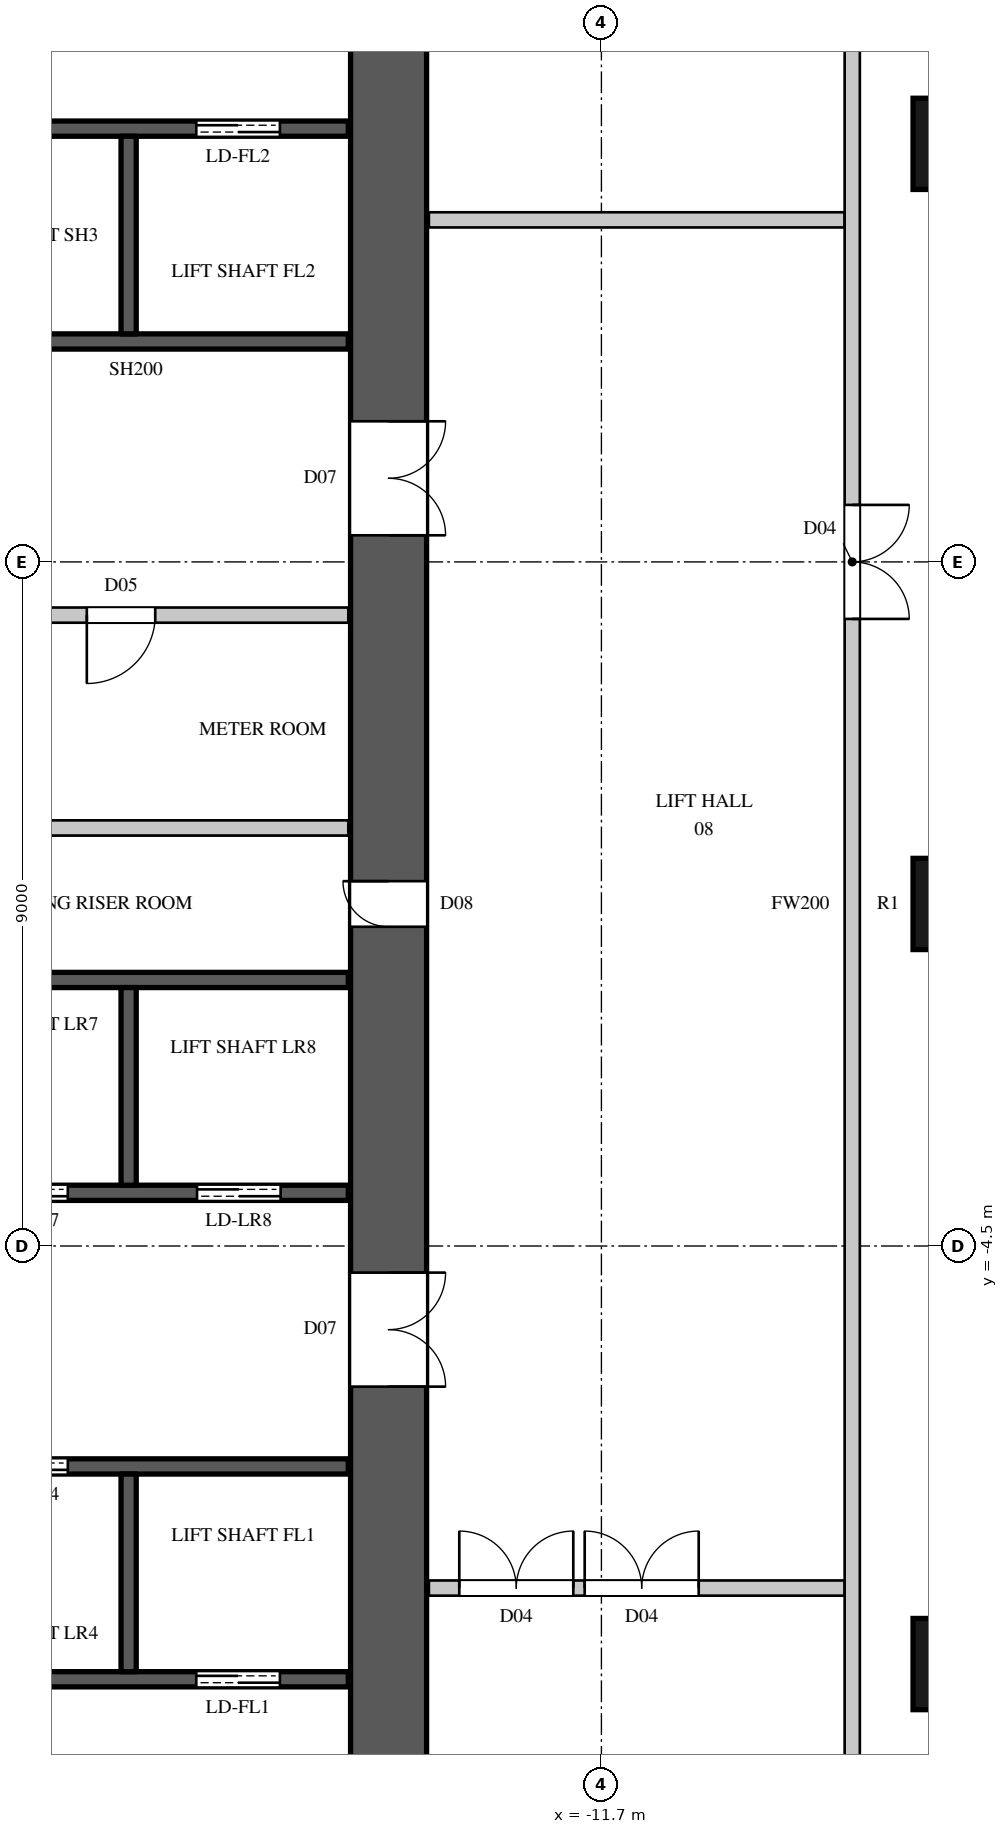
"""IFC4 building model, lengths in metres.
Left out: names, types, materials, properties, quantities, classifications, styles, units other than length and angle.
Written with IfcOpenShell. Run it as: python <this file> out.ifc"""

import sys

from ifc_helpers import new_model, si_unit, direction, frame, frame_2d, origin, origin_2d, place, context, subcontext, project, spatial, rectangle, circle, extrude, element, fill, save


model = new_model("IFC4")
c1 = context("Model", 3, precision=1e-05, world=origin(), true_north=direction((0.0, 1.0)))
c2 = subcontext(c1, "Body", "Model", "MODEL_VIEW")
j1 = project(units=[si_unit("LENGTHUNIT", "METRE"), si_unit("PLANEANGLEUNIT", "RADIAN")], contexts=[c1])
p1 = place(None, origin())
s1 = spatial("IfcSite", under=j1, at=p1, CompositionType="ELEMENT")
p2 = place(p1, origin())
s2 = spatial("IfcBuilding", under=s1, at=p2, CompositionType="ELEMENT")
p3 = place(p2, frame((0.0, 0.0, 59.1)))
s3 = spatial("IfcBuildingStorey", under=s2, at=p3, CompositionType="ELEMENT", Elevation=59.1)
for number, where, z_axis, x_axis in (
    (1, (-7.0, -10.0, 0.0), (0.0, 0.0, 1.0), (1.0, 0.0, 0.0)),
    (2, (-7.0, 0.0, 0.0), (0.0, 0.0, 1.0), (1.0, 0.0, 0.0)),
    (3, (-7.0, 10.0, 0.0), (0.0, 0.0, 1.0), (1.0, 0.0, 0.0)),
):
    element("IfcColumn", number, at=place(p3, frame(where, z_axis=z_axis, x_axis=x_axis)), inside=s3, PredefinedType="COLUMN", context=c2, shape_type="SweptSolid", body=[
        extrude(circle(Radius=0.6, at=origin_2d()), origin(), (0.0, 0.0, 1.0), 3.6),
    ])
p4 = place(p3, frame((-14.5, -14.8, 0.0), z_axis=(0.0, 0.0, 1.0), x_axis=(0.0, 1.0, 0.0)))
e4 = element("IfcWall", 4, at=p4, inside=s3, PredefinedType="SHEAR", context=c2, shape_type="SweptSolid", body=[
    extrude(rectangle(XDim=29.6, YDim=1.0, at=frame_2d((14.8, 0.0))), origin(), (0.0, 0.0, 1.0), 3.6),
])
p5 = place(p4, frame((8.45, 0.0, 0.0)))
e5 = element("IfcOpeningElement", 5, at=p5, cuts=e4, PredefinedType="OPENING", context=c2, shape_type="SweptSolid", body=[
    extrude(rectangle(XDim=1.5, YDim=2.4, at=frame_2d((0.75, 1.2))), frame((0.0, 0.51, 0.0), z_axis=(0.0, -1.0, 0.0), x_axis=(1.0, 0.0, 0.0)), (0.0, 0.0, 1.0), 1.02),
])
p6 = place(p4, frame((19.65, 0.0, 0.0)))
e6 = element("IfcOpeningElement", 6, at=p6, cuts=e4, PredefinedType="OPENING", context=c2, shape_type="SweptSolid", body=[
    extrude(rectangle(XDim=1.5, YDim=2.4, at=frame_2d((0.75, 1.2))), frame((0.0, 0.51, 0.0), z_axis=(0.0, -1.0, 0.0), x_axis=(1.0, 0.0, 0.0)), (0.0, 0.0, 1.0), 1.02),
])
p7 = place(p4, frame((14.5, 0.0, 0.0)))
e7 = element("IfcOpeningElement", 7, at=p7, cuts=e4, PredefinedType="OPENING", context=c2, shape_type="SweptSolid", body=[
    extrude(rectangle(XDim=0.6, YDim=2.0, at=frame_2d((0.3, 1.0))), frame((0.0, 0.51, 0.0), z_axis=(0.0, -1.0, 0.0), x_axis=(1.0, 0.0, 0.0)), (0.0, 0.0, 1.0), 1.02),
])
p8 = place(p3, frame((-13.97, -9.0, 0.0), z_axis=(0.0, 0.0, 1.0), x_axis=(1.0, 0.0, 0.0)))
e8 = element("IfcWall", 8, at=p8, inside=s3, PredefinedType="PARTITIONING", context=c2, shape_type="SweptSolid", body=[
    extrude(rectangle(XDim=5.47, YDim=0.2, at=frame_2d((2.735, 0.0))), origin(), (0.0, 0.0, 1.0), 3.3),
])
p9 = place(p8, frame((0.4, 0.0, 0.0)))
e9 = element("IfcOpeningElement", 9, at=p9, cuts=e8, PredefinedType="OPENING", context=c2, shape_type="SweptSolid", body=[
    extrude(rectangle(XDim=1.5, YDim=2.2, at=frame_2d((0.75, 1.1))), frame((0.0, 0.11, 0.0), z_axis=(0.0, -1.0, 0.0), x_axis=(1.0, 0.0, 0.0)), (0.0, 0.0, 1.0), 0.22),
])
p10 = place(p8, frame((2.05, 0.0, 0.0)))
e10 = element("IfcOpeningElement", 10, at=p10, cuts=e8, PredefinedType="OPENING", context=c2, shape_type="SweptSolid", body=[
    extrude(rectangle(XDim=1.5, YDim=2.2, at=frame_2d((0.75, 1.1))), frame((0.0, 0.11, 0.0), z_axis=(0.0, -1.0, 0.0), x_axis=(1.0, 0.0, 0.0)), (0.0, 0.0, 1.0), 0.22),
])
p11 = place(p3, frame((-13.97, 9.0, 0.0), z_axis=(0.0, 0.0, 1.0), x_axis=(1.0, 0.0, 0.0)))
e11 = element("IfcWall", 11, at=p11, inside=s3, PredefinedType="PARTITIONING", context=c2, shape_type="SweptSolid", body=[
    extrude(rectangle(XDim=5.47, YDim=0.2, at=frame_2d((2.735, 0.0))), origin(), (0.0, 0.0, 1.0), 3.3),
])
p12 = place(p3, frame((-8.4, -15.3, 0.0), z_axis=(0.0, 0.0, 1.0), x_axis=(0.0, 1.0, 0.0)))
e12 = element("IfcWall", 12, at=p12, inside=s3, PredefinedType="PARTITIONING", context=c2, shape_type="SweptSolid", body=[
    extrude(rectangle(XDim=30.6, YDim=0.2, at=frame_2d((15.3, 0.0))), origin(), (0.0, 0.0, 1.0), 3.3),
])
p13 = place(p12, frame((19.05, 0.0, 0.0)))
e13 = element("IfcOpeningElement", 13, at=p13, cuts=e12, PredefinedType="OPENING", context=c2, shape_type="SweptSolid", body=[
    extrude(rectangle(XDim=1.5, YDim=2.2, at=frame_2d((0.75, 1.1))), frame((0.0, 0.11, 0.0), z_axis=(0.0, -1.0, 0.0), x_axis=(1.0, 0.0, 0.0)), (0.0, 0.0, 1.0), 0.22),
])
p14 = place(p12, frame((29.55, 0.0, 0.0)))
e14 = element("IfcOpeningElement", 14, at=p14, cuts=e12, PredefinedType="OPENING", context=c2, shape_type="SweptSolid", body=[
    extrude(rectangle(XDim=0.9, YDim=2.2, at=frame_2d((0.45, 1.1))), frame((0.0, 0.11, 0.0), z_axis=(0.0, -1.0, 0.0), x_axis=(1.0, 0.0, 0.0)), (0.0, 0.0, 1.0), 0.22),
])
p15 = place(p12, frame((0.15, 0.0, 0.0)))
e15 = element("IfcOpeningElement", 15, at=p15, cuts=e12, PredefinedType="OPENING", context=c2, shape_type="SweptSolid", body=[
    extrude(rectangle(XDim=0.9, YDim=2.2, at=frame_2d((0.45, 1.1))), frame((0.0, 0.11, 0.0), z_axis=(0.0, -1.0, 0.0), x_axis=(1.0, 0.0, 0.0)), (0.0, 0.0, 1.0), 0.22),
])
p16 = place(p3, frame((-26.1, 1.0, 0.0), z_axis=(0.0, 0.0, 1.0), x_axis=(1.0, 0.0, 0.0)))
e16 = element("IfcWall", 16, at=p16, inside=s3, PredefinedType="PARTITIONING", context=c2, shape_type="SweptSolid", body=[
    extrude(rectangle(XDim=11.07, YDim=0.2, at=frame_2d((5.535, 0.0))), origin(), (0.0, 0.0, 1.0), 3.3),
])
p17 = place(p3, frame((-21.02, 3.8, 0.0), z_axis=(0.0, 0.0, 1.0), x_axis=(1.0, 0.0, 0.0)))
e17 = element("IfcWall", 17, at=p17, inside=s3, PredefinedType="PARTITIONING", context=c2, shape_type="SweptSolid", body=[
    extrude(rectangle(XDim=5.99, YDim=0.2, at=frame_2d((2.995, 0.0))), origin(), (0.0, 0.0, 1.0), 3.3),
])
p18 = place(p17, frame((2.55, 0.0, 0.0)))
e18 = element("IfcOpeningElement", 18, at=p18, cuts=e17, PredefinedType="OPENING", context=c2, shape_type="SweptSolid", body=[
    extrude(rectangle(XDim=0.9, YDim=2.2, at=frame_2d((0.45, 1.1))), frame((0.0, 0.11, 0.0), z_axis=(0.0, -1.0, 0.0), x_axis=(1.0, 0.0, 0.0)), (0.0, 0.0, 1.0), 0.22),
])
p19 = place(p3, frame((-28.97, -7.4, 0.0), z_axis=(0.0, 0.0, 1.0), x_axis=(1.0, 0.0, 0.0)))
e19 = element("IfcWall", 19, at=p19, inside=s3, PredefinedType="SHEAR", context=c2, shape_type="SweptSolid", body=[
    extrude(rectangle(XDim=13.94, YDim=0.2, at=frame_2d((6.97, 0.0))), origin(), (0.0, 0.0, 1.0), 3.3),
])
p20 = place(p19, frame((0.9, 0.0, 0.0)))
e20 = element("IfcOpeningElement", 20, at=p20, cuts=e19, PredefinedType="OPENING", context=c2, shape_type="SweptSolid", body=[
    extrude(rectangle(XDim=1.1, YDim=2.2, at=frame_2d((0.55, 1.1))), frame((0.0, 0.11, 0.0), z_axis=(0.0, -1.0, 0.0), x_axis=(1.0, 0.0, 0.0)), (0.0, 0.0, 1.0), 0.22),
])
p21 = place(p19, frame((3.7, 0.0, 0.0)))
e21 = element("IfcOpeningElement", 21, at=p21, cuts=e19, PredefinedType="OPENING", context=c2, shape_type="SweptSolid", body=[
    extrude(rectangle(XDim=1.1, YDim=2.2, at=frame_2d((0.55, 1.1))), frame((0.0, 0.11, 0.0), z_axis=(0.0, -1.0, 0.0), x_axis=(1.0, 0.0, 0.0)), (0.0, 0.0, 1.0), 0.22),
])
p22 = place(p19, frame((6.4, 0.0, 0.0)))
e22 = element("IfcOpeningElement", 22, at=p22, cuts=e19, PredefinedType="OPENING", context=c2, shape_type="SweptSolid", body=[
    extrude(rectangle(XDim=1.1, YDim=2.2, at=frame_2d((0.55, 1.1))), frame((0.0, 0.11, 0.0), z_axis=(0.0, -1.0, 0.0), x_axis=(1.0, 0.0, 0.0)), (0.0, 0.0, 1.0), 0.22),
])
p23 = place(p19, frame((9.15, 0.0, 0.0)))
e23 = element("IfcOpeningElement", 23, at=p23, cuts=e19, PredefinedType="OPENING", context=c2, shape_type="SweptSolid", body=[
    extrude(rectangle(XDim=1.1, YDim=2.2, at=frame_2d((0.55, 1.1))), frame((0.0, 0.11, 0.0), z_axis=(0.0, -1.0, 0.0), x_axis=(1.0, 0.0, 0.0)), (0.0, 0.0, 1.0), 0.22),
])
p24 = place(p3, frame((-28.97, -3.8, 0.0), z_axis=(0.0, 0.0, 1.0), x_axis=(1.0, 0.0, 0.0)))
e24 = element("IfcWall", 24, at=p24, inside=s3, PredefinedType="SHEAR", context=c2, shape_type="SweptSolid", body=[
    extrude(rectangle(XDim=13.94, YDim=0.2, at=frame_2d((6.97, 0.0))), origin(), (0.0, 0.0, 1.0), 3.3),
])
p25 = place(p24, frame((3.7, 0.0, 0.0)))
e25 = element("IfcOpeningElement", 25, at=p25, cuts=e24, PredefinedType="OPENING", context=c2, shape_type="SweptSolid", body=[
    extrude(rectangle(XDim=1.1, YDim=2.2, at=frame_2d((0.55, 1.1))), frame((0.0, 0.11, 0.0), z_axis=(0.0, -1.0, 0.0), x_axis=(1.0, 0.0, 0.0)), (0.0, 0.0, 1.0), 0.22),
])
p26 = place(p24, frame((6.4, 0.0, 0.0)))
e26 = element("IfcOpeningElement", 26, at=p26, cuts=e24, PredefinedType="OPENING", context=c2, shape_type="SweptSolid", body=[
    extrude(rectangle(XDim=1.1, YDim=2.2, at=frame_2d((0.55, 1.1))), frame((0.0, 0.11, 0.0), z_axis=(0.0, -1.0, 0.0), x_axis=(1.0, 0.0, 0.0)), (0.0, 0.0, 1.0), 0.22),
])
p27 = place(p24, frame((9.15, 0.0, 0.0)))
e27 = element("IfcOpeningElement", 27, at=p27, cuts=e24, PredefinedType="OPENING", context=c2, shape_type="SweptSolid", body=[
    extrude(rectangle(XDim=1.1, YDim=2.2, at=frame_2d((0.55, 1.1))), frame((0.0, 0.11, 0.0), z_axis=(0.0, -1.0, 0.0), x_axis=(1.0, 0.0, 0.0)), (0.0, 0.0, 1.0), 0.22),
])
p28 = place(p24, frame((11.95, 0.0, 0.0)))
e28 = element("IfcOpeningElement", 28, at=p28, cuts=e24, PredefinedType="OPENING", context=c2, shape_type="SweptSolid", body=[
    extrude(rectangle(XDim=1.1, YDim=2.2, at=frame_2d((0.55, 1.1))), frame((0.0, 0.11, 0.0), z_axis=(0.0, -1.0, 0.0), x_axis=(1.0, 0.0, 0.0)), (0.0, 0.0, 1.0), 0.22),
])
p29 = place(p3, frame((-28.97, -1.0, 0.0), z_axis=(0.0, 0.0, 1.0), x_axis=(1.0, 0.0, 0.0)))
e29 = element("IfcWall", 29, at=p29, inside=s3, PredefinedType="SHEAR", context=c2, shape_type="SweptSolid", body=[
    extrude(rectangle(XDim=13.94, YDim=0.2, at=frame_2d((6.97, 0.0))), origin(), (0.0, 0.0, 1.0), 3.3),
])
p30 = place(p3, frame((-20.62, 7.4, 0.0), z_axis=(0.0, 0.0, 1.0), x_axis=(1.0, 0.0, 0.0)))
e30 = element("IfcWall", 30, at=p30, inside=s3, PredefinedType="SHEAR", context=c2, shape_type="SweptSolid", body=[
    extrude(rectangle(XDim=5.59, YDim=0.2, at=frame_2d((2.795, 0.0))), origin(), (0.0, 0.0, 1.0), 3.3),
])
p31 = place(p3, frame((-19.98, -10.2, 0.0), z_axis=(0.0, 0.0, 1.0), x_axis=(1.0, 0.0, 0.0)))
e31 = element("IfcWall", 31, at=p31, inside=s3, PredefinedType="SHEAR", context=c2, shape_type="SweptSolid", body=[
    extrude(rectangle(XDim=4.95, YDim=0.2, at=frame_2d((2.475, 0.0))), origin(), (0.0, 0.0, 1.0), 3.3),
])
p32 = place(p31, frame((2.95, 0.0, 0.0)))
e32 = element("IfcOpeningElement", 32, at=p32, cuts=e31, PredefinedType="OPENING", context=c2, shape_type="SweptSolid", body=[
    extrude(rectangle(XDim=1.1, YDim=2.2, at=frame_2d((0.55, 1.1))), frame((0.0, 0.11, 0.0), z_axis=(0.0, -1.0, 0.0), x_axis=(1.0, 0.0, 0.0)), (0.0, 0.0, 1.0), 0.22),
])
p33 = place(p3, frame((-19.98, 10.2, 0.0), z_axis=(0.0, 0.0, 1.0), x_axis=(1.0, 0.0, 0.0)))
e33 = element("IfcWall", 33, at=p33, inside=s3, PredefinedType="SHEAR", context=c2, shape_type="SweptSolid", body=[
    extrude(rectangle(XDim=4.95, YDim=0.2, at=frame_2d((2.475, 0.0))), origin(), (0.0, 0.0, 1.0), 3.3),
])
p34 = place(p33, frame((2.95, 0.0, 0.0)))
e34 = element("IfcOpeningElement", 34, at=p34, cuts=e33, PredefinedType="OPENING", context=c2, shape_type="SweptSolid", body=[
    extrude(rectangle(XDim=1.1, YDim=2.2, at=frame_2d((0.55, 1.1))), frame((0.0, 0.11, 0.0), z_axis=(0.0, -1.0, 0.0), x_axis=(1.0, 0.0, 0.0)), (0.0, 0.0, 1.0), 0.22),
])
p35 = place(p3, frame((-17.92, -10.1, 0.0), z_axis=(0.0, 0.0, 1.0), x_axis=(0.0, 1.0, 0.0)))
e35 = element("IfcWall", 35, at=p35, inside=s3, PredefinedType="SHEAR", context=c2, shape_type="SweptSolid", body=[
    extrude(rectangle(XDim=2.6, YDim=0.2, at=frame_2d((1.3, 0.0))), origin(), (0.0, 0.0, 1.0), 3.6),
])
p36 = place(p3, frame((-17.92, -3.7, 0.0), z_axis=(0.0, 0.0, 1.0), x_axis=(0.0, 1.0, 0.0)))
e36 = element("IfcWall", 36, at=p36, inside=s3, PredefinedType="SHEAR", context=c2, shape_type="SweptSolid", body=[
    extrude(rectangle(XDim=2.6, YDim=0.2, at=frame_2d((1.3, 0.0))), origin(), (0.0, 0.0, 1.0), 3.6),
])
p37 = place(p3, frame((-17.92, 7.5, 0.0), z_axis=(0.0, 0.0, 1.0), x_axis=(0.0, 1.0, 0.0)))
e37 = element("IfcWall", 37, at=p37, inside=s3, PredefinedType="SHEAR", context=c2, shape_type="SweptSolid", body=[
    extrude(rectangle(XDim=2.6, YDim=0.2, at=frame_2d((1.3, 0.0))), origin(), (0.0, 0.0, 1.0), 3.6),
])
p38 = place(p18, origin())
e38 = element("IfcDoor", 38, at=p38, inside=s3, OperationType="SINGLE_SWING_RIGHT", PredefinedType="DOOR", context=c2, shape_type="SweptSolid", body=[
    extrude(rectangle(XDim=0.9, YDim=2.2, at=frame_2d((0.45, 1.1))), frame((0.0, 0.025, 0.0), z_axis=(0.0, -1.0, 0.0), x_axis=(1.0, 0.0, 0.0)), (0.0, 0.0, 1.0), 0.05),
])
fill(e18, e38)
p39 = place(p23, origin())
e39 = element("IfcDoor", 39, at=p39, inside=s3, OperationType="DOUBLE_DOOR_SLIDING", PredefinedType="DOOR", context=c2, shape_type="SweptSolid", body=[
    extrude(rectangle(XDim=1.1, YDim=2.2, at=frame_2d((0.55, 1.1))), frame((0.0, 0.025, 0.0), z_axis=(0.0, -1.0, 0.0), x_axis=(1.0, 0.0, 0.0)), (0.0, 0.0, 1.0), 0.05),
])
fill(e23, e39)
p40 = place(p32, origin())
e40 = element("IfcDoor", 40, at=p40, inside=s3, OperationType="DOUBLE_DOOR_SLIDING", PredefinedType="DOOR", context=c2, shape_type="SweptSolid", body=[
    extrude(rectangle(XDim=1.1, YDim=2.2, at=frame_2d((0.55, 1.1))), frame((0.0, 0.025, 0.0), z_axis=(0.0, -1.0, 0.0), x_axis=(1.0, 0.0, 0.0)), (0.0, 0.0, 1.0), 0.05),
])
fill(e32, e40)
p41 = place(p27, origin())
e41 = element("IfcDoor", 41, at=p41, inside=s3, OperationType="DOUBLE_DOOR_SLIDING", PredefinedType="DOOR", context=c2, shape_type="SweptSolid", body=[
    extrude(rectangle(XDim=1.1, YDim=2.2, at=frame_2d((0.55, 1.1))), frame((0.0, 0.025, 0.0), z_axis=(0.0, -1.0, 0.0), x_axis=(1.0, 0.0, 0.0)), (0.0, 0.0, 1.0), 0.05),
])
fill(e27, e41)
p42 = place(p28, origin())
e42 = element("IfcDoor", 42, at=p42, inside=s3, OperationType="DOUBLE_DOOR_SLIDING", PredefinedType="DOOR", context=c2, shape_type="SweptSolid", body=[
    extrude(rectangle(XDim=1.1, YDim=2.2, at=frame_2d((0.55, 1.1))), frame((0.0, 0.025, 0.0), z_axis=(0.0, -1.0, 0.0), x_axis=(1.0, 0.0, 0.0)), (0.0, 0.0, 1.0), 0.05),
])
fill(e28, e42)
p43 = place(p34, origin())
e43 = element("IfcDoor", 43, at=p43, inside=s3, OperationType="DOUBLE_DOOR_SLIDING", PredefinedType="DOOR", context=c2, shape_type="SweptSolid", body=[
    extrude(rectangle(XDim=1.1, YDim=2.2, at=frame_2d((0.55, 1.1))), frame((0.0, 0.025, 0.0), z_axis=(0.0, -1.0, 0.0), x_axis=(1.0, 0.0, 0.0)), (0.0, 0.0, 1.0), 0.05),
])
fill(e34, e43)
p44 = place(p13, origin())
e44 = element("IfcDoor", 44, at=p44, inside=s3, OperationType="DOUBLE_DOOR_SINGLE_SWING", PredefinedType="DOOR", context=c2, shape_type="SweptSolid", body=[
    extrude(rectangle(XDim=1.5, YDim=2.2, at=frame_2d((0.75, 1.1))), frame((0.0, 0.025, 0.0), z_axis=(0.0, -1.0, 0.0), x_axis=(1.0, 0.0, 0.0)), (0.0, 0.0, 1.0), 0.05),
])
fill(e13, e44)
p45 = place(p9, origin())
e45 = element("IfcDoor", 45, at=p45, inside=s3, OperationType="DOUBLE_DOOR_SINGLE_SWING", PredefinedType="DOOR", context=c2, shape_type="SweptSolid", body=[
    extrude(rectangle(XDim=1.5, YDim=2.2, at=frame_2d((0.75, 1.1))), frame((0.0, 0.025, 0.0), z_axis=(0.0, -1.0, 0.0), x_axis=(1.0, 0.0, 0.0)), (0.0, 0.0, 1.0), 0.05),
])
fill(e9, e45)
p46 = place(p10, origin())
e46 = element("IfcDoor", 46, at=p46, inside=s3, OperationType="DOUBLE_DOOR_SINGLE_SWING", PredefinedType="DOOR", context=c2, shape_type="SweptSolid", body=[
    extrude(rectangle(XDim=1.5, YDim=2.2, at=frame_2d((0.75, 1.1))), frame((0.0, 0.025, 0.0), z_axis=(0.0, -1.0, 0.0), x_axis=(1.0, 0.0, 0.0)), (0.0, 0.0, 1.0), 0.05),
])
fill(e10, e46)
p47 = place(p5, origin())
e47 = element("IfcDoor", 47, at=p47, inside=s3, OperationType="DOUBLE_DOOR_SINGLE_SWING", PredefinedType="DOOR", context=c2, shape_type="SweptSolid", body=[
    extrude(rectangle(XDim=1.5, YDim=2.4, at=frame_2d((0.75, 1.2))), frame((0.0, -0.445, 0.0), z_axis=(0.0, -1.0, 0.0), x_axis=(1.0, 0.0, 0.0)), (0.0, 0.0, 1.0), 0.05),
])
fill(e5, e47)
p48 = place(p6, origin())
e48 = element("IfcDoor", 48, at=p48, inside=s3, OperationType="DOUBLE_DOOR_SINGLE_SWING", PredefinedType="DOOR", context=c2, shape_type="SweptSolid", body=[
    extrude(rectangle(XDim=1.5, YDim=2.4, at=frame_2d((0.75, 1.2))), frame((0.0, -0.445, 0.0), z_axis=(0.0, -1.0, 0.0), x_axis=(1.0, 0.0, 0.0)), (0.0, 0.0, 1.0), 0.05),
])
fill(e6, e48)
p49 = place(p7, origin())
e49 = element("IfcDoor", 49, at=p49, inside=s3, OperationType="SINGLE_SWING_RIGHT", PredefinedType="DOOR", context=c2, shape_type="SweptSolid", body=[
    extrude(rectangle(XDim=0.6, YDim=2.0, at=frame_2d((0.3, 1.0))), frame((0.0, 0.495, 0.0), z_axis=(0.0, -1.0, 0.0), x_axis=(1.0, 0.0, 0.0)), (0.0, 0.0, 1.0), 0.05),
])
fill(e7, e49)
save(model, sys.argv[1])
